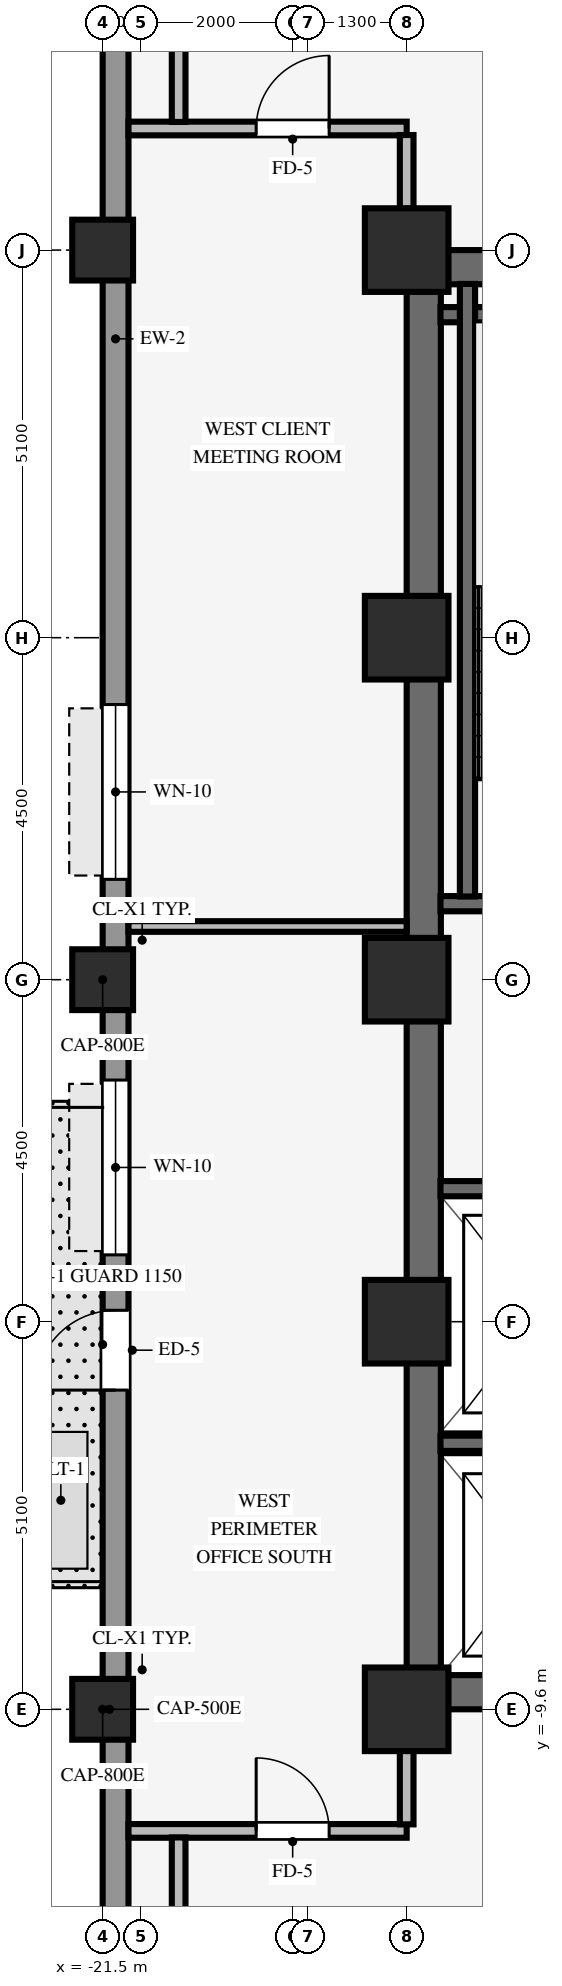
"""IFC4 building model, lengths in metres.
Left out: names, types, materials, properties, quantities, classifications, styles, units other than length and angle.
Written with IfcOpenShell. Run it as: python <this file> out.ifc"""

import sys

from ifc_helpers import new_model, si_unit, direction, frame, frame_2d, origin, origin_2d, place, context, subcontext, project, spatial, rectangle, hollow_rectangle, extrude, source, transform, mapped, element, fill, save


model = new_model("IFC4")
c1 = context("Model", 3, precision=1e-05, world=origin(), true_north=direction((0.0, 1.0)))
c2 = subcontext(c1, "Body", "Model", "MODEL_VIEW")
j1 = project(units=[si_unit("LENGTHUNIT", "METRE"), si_unit("PLANEANGLEUNIT", "RADIAN")], contexts=[c1])
p1 = place(None, origin())
s1 = spatial("IfcSite", under=j1, at=p1, CompositionType="ELEMENT")
p2 = place(p1, origin())
s2 = spatial("IfcBuilding", under=s1, at=p2, CompositionType="ELEMENT")
p3 = place(p2, frame((0.0, 0.0, 82.35)))
s3 = spatial("IfcBuildingStorey", under=s2, at=p3, CompositionType="ELEMENT", Elevation=82.35)
for number, where, z_axis, x_axis in (
    (1, (-17.5, -9.375, 0.0), (0.0, 0.0, 1.0), (1.0, 0.0, 0.0)),
    (2, (-17.5, 9.375, 0.0), (0.0, 0.0, 1.0), (1.0, 0.0, 0.0)),
):
    element("IfcWall", number, at=place(p3, frame(where, z_axis=z_axis, x_axis=x_axis)), inside=s3, PredefinedType="SHEAR", context=c2, shape_type="SweptSolid", body=[
        extrude(rectangle(XDim=8.5, YDim=0.45, at=frame_2d((4.25, 0.0))), origin(), (0.0, 0.0, 1.0), 3.25),
    ])
p4 = place(p3, frame((-17.275, -9.155, 0.0), z_axis=(0.0, 0.0, 1.0), x_axis=(0.0, 1.0, 0.0)))
e3 = element("IfcWall", 3, at=p4, inside=s3, PredefinedType="SHEAR", context=c2, shape_type="SweptSolid", body=[
    extrude(rectangle(XDim=18.31, YDim=0.45, at=frame_2d((9.155, 0.0))), origin(), (0.0, 0.0, 1.0), 3.25),
])
for number, where, z_axis, x_axis in (
    (4, (-17.5, -9.6, 0.0), (0.0, 0.0, 1.0), (1.0, 0.0, 0.0)),
    (5, (-17.5, -4.5, 0.0), (0.0, 0.0, 1.0), (1.0, 0.0, 0.0)),
    (6, (-17.5, 4.5, 0.0), (0.0, 0.0, 1.0), (1.0, 0.0, 0.0)),
    (7, (-17.5, 9.6, 0.0), (0.0, 0.0, 1.0), (1.0, 0.0, 0.0)),
    (8, (-17.5, 0.0, 0.0), (0.0, 0.0, 1.0), (1.0, 0.0, 0.0)),
):
    element("IfcColumn", number, at=place(p3, frame(where, z_axis=z_axis, x_axis=x_axis)), inside=s3, PredefinedType="COLUMN", context=c2, shape_type="SweptSolid", body=[
        extrude(rectangle(XDim=1.1, YDim=1.1, at=origin_2d()), origin(), (0.0, 0.0, 1.0), 3.25),
    ])
for number, where, z_axis, x_axis in (
    (9, (-21.5, -9.6, 0.0), (0.0, 0.0, 1.0), (1.0, 0.0, 0.0)),
    (10, (-21.5, 0.0, 0.0), (0.0, 0.0, 1.0), (1.0, 0.0, 0.0)),
    (11, (-21.5, 9.6, 0.0), (0.0, 0.0, 1.0), (1.0, 0.0, 0.0)),
):
    element("IfcColumn", number, at=place(p3, frame(where, z_axis=z_axis, x_axis=x_axis)), inside=s3, PredefinedType="COLUMN", context=c2, shape_type="SweptSolid", body=[
        extrude(hollow_rectangle(XDim=0.8, YDim=0.8, WallThickness=0.055, InnerFilletRadius=0.055, OuterFilletRadius=0.11, at=origin_2d()), origin(), (0.0, 0.0, 1.0), 3.25),
    ])
p5 = place(p3, frame((-21.33, -20.764, 0.0), z_axis=(0.0, 0.0, 1.0), x_axis=(0.0, 1.0, 0.0)))
e12 = element("IfcWall", 12, at=p5, inside=s3, PredefinedType="STANDARD", context=c2, shape_type="SweptSolid", body=[
    extrude(rectangle(XDim=41.528, YDim=0.34, at=frame_2d((20.764, 0.0))), origin(), (0.0, 0.0, 1.0), 3.24),
])
p6 = place(p5, frame((15.364, 0.0, 0.0)))
e13 = element("IfcOpeningElement", 13, at=p6, cuts=e12, PredefinedType="OPENING", context=c2, shape_type="SweptSolid", body=[
    extrude(rectangle(XDim=1.05, YDim=2.1, at=frame_2d((0.525, 1.05))), frame((0.0, 0.18, 0.0), z_axis=(0.0, -1.0, 0.0), x_axis=(1.0, 0.0, 0.0)), (0.0, 0.0, 1.0), 0.36),
])
p7 = place(p5, frame((17.144, 0.0, 0.8)))
e14 = element("IfcOpeningElement", 14, at=p7, cuts=e12, PredefinedType="OPENING", context=c2, shape_type="SweptSolid", body=[
    extrude(rectangle(XDim=2.3, YDim=1.62, at=frame_2d((1.15, 0.81))), frame((0.0, 0.18, 0.0), z_axis=(0.0, -1.0, 0.0), x_axis=(1.0, 0.0, 0.0)), (0.0, 0.0, 1.0), 0.36),
])
p8 = place(p5, frame((22.084, 0.0, 0.8)))
e15 = element("IfcOpeningElement", 15, at=p8, cuts=e12, PredefinedType="OPENING", context=c2, shape_type="SweptSolid", body=[
    extrude(rectangle(XDim=2.3, YDim=1.62, at=frame_2d((1.15, 0.81))), frame((0.0, 0.18, 0.0), z_axis=(0.0, -1.0, 0.0), x_axis=(1.0, 0.0, 0.0)), (0.0, 0.0, 1.0), 0.36),
])
for number, where, z_axis, x_axis in (
    (16, (-17.055, 1.0, 0.0), (0.0, 0.0, 1.0), (1.0, 0.0, 0.0)),
    (17, (-17.055, 8.75, 0.0), (0.0, 0.0, 1.0), (1.0, 0.0, 0.0)),
):
    element("IfcWall", number, at=place(p3, frame(where, z_axis=z_axis, x_axis=x_axis)), inside=s3, PredefinedType="SHEAR", context=c2, shape_type="SweptSolid", body=[
        extrude(rectangle(XDim=3.52, YDim=0.2, at=frame_2d((1.76, 0.0))), origin(), (0.0, 0.0, 1.0), 3.25),
    ])
p9 = place(p3, frame((-16.7, 1.095, 0.0), z_axis=(0.0, 0.0, 1.0), x_axis=(0.0, 1.0, 0.0)))
e18 = element("IfcWall", 18, at=p9, inside=s3, PredefinedType="SHEAR", context=c2, shape_type="SweptSolid", body=[
    extrude(rectangle(XDim=8.06, YDim=0.2, at=frame_2d((4.03, 0.0))), origin(), (0.0, 0.0, 1.0), 3.25),
])
p10 = place(p3, frame((-17.055, -6.1, 0.0), z_axis=(0.0, 0.0, 1.0), x_axis=(1.0, 0.0, 0.0)))
e19 = element("IfcWall", 19, at=p10, inside=s3, PredefinedType="SHEAR", context=c2, shape_type="SweptSolid", body=[
    extrude(rectangle(XDim=2.805, YDim=0.2, at=frame_2d((1.402, 0.0))), origin(), (0.0, 0.0, 1.0), 3.25),
])
p11 = place(p3, frame((-17.055, -2.75, 0.0), z_axis=(0.0, 0.0, 1.0), x_axis=(1.0, 0.0, 0.0)))
e20 = element("IfcWall", 20, at=p11, inside=s3, PredefinedType="SHEAR", context=c2, shape_type="SweptSolid", body=[
    extrude(rectangle(XDim=2.61, YDim=0.2, at=frame_2d((1.305, 0.0))), origin(), (0.0, 0.0, 1.0), 3.25),
])
p12 = place(p3, frame((-21.16, -11.2, 0.0), z_axis=(0.0, 0.0, 1.0), x_axis=(1.0, 0.0, 0.0)))
e21 = element("IfcWall", 21, at=p12, inside=s3, PredefinedType="PARTITIONING", context=c2, shape_type="SweptSolid", body=[
    extrude(rectangle(XDim=3.66, YDim=0.18, at=frame_2d((1.83, 0.0))), origin(), (0.0, 0.0, 1.0), 3.24),
])
p13 = place(p12, frame((1.68, 0.0, 0.0)))
e22 = element("IfcOpeningElement", 22, at=p13, cuts=e21, PredefinedType="OPENING", context=c2, shape_type="SweptSolid", body=[
    extrude(rectangle(XDim=0.96, YDim=2.1, at=frame_2d((0.48, 1.05))), frame((0.0, 0.1, 0.0), z_axis=(0.0, -1.0, 0.0), x_axis=(1.0, 0.0, 0.0)), (0.0, 0.0, 1.0), 0.2),
])
p14 = place(p3, frame((-21.16, 0.7, 0.0), z_axis=(0.0, 0.0, 1.0), x_axis=(1.0, 0.0, 0.0)))
e23 = element("IfcWall", 23, at=p14, inside=s3, PredefinedType="PARTITIONING", context=c2, shape_type="SweptSolid", body=[
    extrude(rectangle(XDim=3.66, YDim=0.14, at=frame_2d((1.83, 0.0))), origin(), (0.0, 0.0, 1.0), 3.24),
])
p15 = place(p3, frame((-21.16, 11.2, 0.0), z_axis=(0.0, 0.0, 1.0), x_axis=(1.0, 0.0, 0.0)))
e24 = element("IfcWall", 24, at=p15, inside=s3, PredefinedType="PARTITIONING", context=c2, shape_type="SweptSolid", body=[
    extrude(rectangle(XDim=3.66, YDim=0.18, at=frame_2d((1.83, 0.0))), origin(), (0.0, 0.0, 1.0), 3.24),
])
p16 = place(p15, frame((1.68, 0.0, 0.0)))
e25 = element("IfcOpeningElement", 25, at=p16, cuts=e24, PredefinedType="OPENING", context=c2, shape_type="SweptSolid", body=[
    extrude(rectangle(XDim=0.96, YDim=2.1, at=frame_2d((0.48, 1.05))), frame((0.0, 0.1, 0.0), z_axis=(0.0, -1.0, 0.0), x_axis=(1.0, 0.0, 0.0)), (0.0, 0.0, 1.0), 0.2),
])
for number, where, z_axis, x_axis in (
    (26, (-20.5, -13.514, 0.0), (0.0, 0.0, 1.0), (0.0, 1.0, 0.0)),
    (27, (-20.5, 11.286, 0.0), (0.0, 0.0, 1.0), (0.0, 1.0, 0.0)),
):
    element("IfcWall", number, at=place(p3, frame(where, z_axis=z_axis, x_axis=x_axis)), inside=s3, PredefinedType="PARTITIONING", context=c2, shape_type="SweptSolid", body=[
        extrude(rectangle(XDim=2.228, YDim=0.18, at=frame_2d((1.114, 0.0))), origin(), (0.0, 0.0, 1.0), 3.24),
    ])
for number, where, z_axis, x_axis in (
    (28, (-17.5, -11.114, 0.0), (0.0, 0.0, 1.0), (0.0, 1.0, 0.0)),
    (29, (-17.5, 10.146, 0.0), (0.0, 0.0, 1.0), (0.0, 1.0, 0.0)),
):
    element("IfcWall", number, at=place(p3, frame(where, z_axis=z_axis, x_axis=x_axis)), inside=s3, PredefinedType="PARTITIONING", context=c2, shape_type="SweptSolid", body=[
        extrude(rectangle(XDim=0.968, YDim=0.18, at=frame_2d((0.484, 0.0))), origin(), (0.0, 0.0, 1.0), 2.618),
    ])
m1 = source(origin(), c2, "Body", "SweptSolid", [
    extrude(rectangle(XDim=1.05, YDim=2.1, at=frame_2d((0.525, 1.05))), frame((0.0, 0.025, 0.0), z_axis=(0.0, -1.0, 0.0), x_axis=(1.0, 0.0, 0.0)), (0.0, 0.0, 1.0), 0.05),
])
p17 = place(p6, origin())
e30 = element("IfcDoor", 30, at=p17, inside=s3, OperationType="SINGLE_SWING_LEFT", PredefinedType="DOOR", context=c2, shape_type="MappedRepresentation", body=[
    mapped(m1, transform((0.0, 0.0, 0.0), scale=1.0)),
])
fill(e13, e30)
m2 = source(origin(), c2, "Body", "SweptSolid", [
    extrude(rectangle(XDim=2.3, YDim=1.62, at=frame_2d((1.15, 0.81))), frame((0.0, 0.03, 0.0), z_axis=(0.0, -1.0, 0.0), x_axis=(1.0, 0.0, 0.0)), (0.0, 0.0, 1.0), 0.06),
])
p18 = place(p7, origin())
e31 = element("IfcWindow", 31, at=p18, inside=s3, PartitioningType="SINGLE_PANEL", PredefinedType="WINDOW", context=c2, shape_type="MappedRepresentation", body=[
    mapped(m2, transform((0.0, 0.0, 0.0), scale=1.0)),
])
fill(e14, e31)
p19 = place(p8, origin())
e32 = element("IfcWindow", 32, at=p19, inside=s3, PartitioningType="SINGLE_PANEL", PredefinedType="WINDOW", context=c2, shape_type="MappedRepresentation", body=[
    mapped(m2, transform((0.0, 0.0, 0.0), scale=1.0)),
])
fill(e15, e32)
m3 = source(origin(), c2, "Body", "SweptSolid", [
    extrude(rectangle(XDim=0.96, YDim=2.1, at=frame_2d((0.48, 1.05))), frame((0.0, 0.025, 0.0), z_axis=(0.0, -1.0, 0.0), x_axis=(1.0, 0.0, 0.0)), (0.0, 0.0, 1.0), 0.05),
])
p20 = place(p13, origin())
e33 = element("IfcDoor", 33, at=p20, inside=s3, OperationType="SINGLE_SWING_LEFT", PredefinedType="DOOR", context=c2, shape_type="MappedRepresentation", body=[
    mapped(m3, transform((0.0, 0.0, 0.0), scale=1.0)),
])
fill(e22, e33)
p21 = place(p16, origin())
e34 = element("IfcDoor", 34, at=p21, inside=s3, OperationType="SINGLE_SWING_RIGHT", PredefinedType="DOOR", context=c2, shape_type="MappedRepresentation", body=[
    mapped(m3, transform((0.0, 0.0, 0.0), scale=1.0)),
])
fill(e25, e34)
save(model, sys.argv[1])
